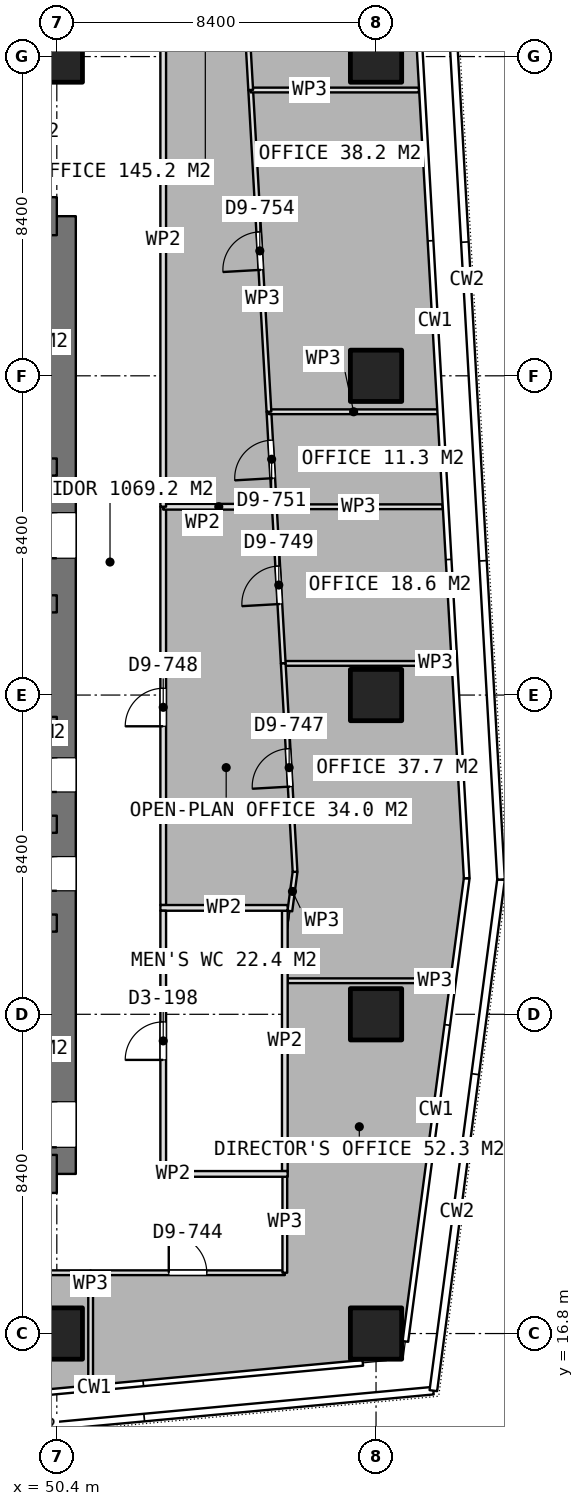
"""IFC4 building model, lengths in metres.
Left out: names, types, materials, properties, quantities, classifications, styles, units other than length and angle.
Written with IfcOpenShell. Run it as: python <this file> out.ifc"""

import sys

from ifc_helpers import new_model, si_unit, direction, frame, frame_2d, origin, origin_2d, place, context, subcontext, project, spatial, rectangle, extrude, element, fill, save


model = new_model("IFC4")
c1 = context("Model", 3, precision=1e-05, world=origin(), true_north=direction((0.0, 1.0)))
c2 = subcontext(c1, "Body", "Model", "MODEL_VIEW")
j1 = project(units=[si_unit("LENGTHUNIT", "METRE"), si_unit("PLANEANGLEUNIT", "RADIAN")], contexts=[c1])
p1 = place(None, origin())
s1 = spatial("IfcSite", under=j1, at=p1, CompositionType="ELEMENT")
p2 = place(p1, origin())
s2 = spatial("IfcBuilding", under=s1, at=p2, CompositionType="ELEMENT")
p3 = place(p2, frame((0.0, 0.0, 187.7)))
s3 = spatial("IfcBuildingStorey", under=s2, at=p3, CompositionType="ELEMENT", Elevation=187.7)
for number, where, z_axis, x_axis in (
    (1, (40.0, 21.0, 0.0), (0.0, 0.0, 1.0), (1.0, 0.0, 0.0)),
    (2, (40.0, 46.2, 0.0), (0.0, 0.0, 1.0), (1.0, 0.0, 0.0)),
):
    element("IfcWall", number, at=place(p3, frame(where, z_axis=z_axis, x_axis=x_axis)), inside=s3, PredefinedType="SHEAR", context=c2, shape_type="SweptSolid", body=[
        extrude(rectangle(XDim=10.4, YDim=1.0, at=frame_2d((5.2, 0.0))), origin(), (0.0, 0.0, 1.0), 3.75),
    ])
p4 = place(p3, frame((50.4, 21.0, 0.0), z_axis=(0.0, 0.0, 1.0), x_axis=(0.0, 1.0, 0.0)))
e3 = element("IfcWall", 3, at=p4, inside=s3, PredefinedType="SHEAR", context=c2, shape_type="SweptSolid", body=[
    extrude(rectangle(XDim=25.2, YDim=1.0, at=frame_2d((12.6, 0.0))), origin(), (0.0, 0.0, 1.0), 3.75),
])
p5 = place(p4, frame((16.2, 0.0, 0.0)))
e4 = element("IfcOpeningElement", 4, at=p5, cuts=e3, PredefinedType="OPENING", context=c2, shape_type="SweptSolid", body=[
    extrude(rectangle(XDim=1.2, YDim=2.1, at=frame_2d((0.6, 1.05))), frame((0.0, 0.51, 0.0), z_axis=(0.0, -1.0, 0.0), x_axis=(1.0, 0.0, 0.0)), (0.0, 0.0, 1.0), 1.02),
])
p6 = place(p4, frame((10.05, 0.0, 0.0)))
e5 = element("IfcOpeningElement", 5, at=p6, cuts=e3, PredefinedType="OPENING", context=c2, shape_type="SweptSolid", body=[
    extrude(rectangle(XDim=0.9, YDim=2.1, at=frame_2d((0.45, 1.05))), frame((0.0, 0.51, 0.0), z_axis=(0.0, -1.0, 0.0), x_axis=(1.0, 0.0, 0.0)), (0.0, 0.0, 1.0), 1.02),
])
p7 = place(p4, frame((7.45, 0.0, 0.0)))
e6 = element("IfcOpeningElement", 6, at=p7, cuts=e3, PredefinedType="OPENING", context=c2, shape_type="SweptSolid", body=[
    extrude(rectangle(XDim=0.9, YDim=2.1, at=frame_2d((0.45, 1.05))), frame((0.0, 0.51, 0.0), z_axis=(0.0, -1.0, 0.0), x_axis=(1.0, 0.0, 0.0)), (0.0, 0.0, 1.0), 1.02),
])
p8 = place(p4, frame((0.7, 0.0, 0.0)))
e7 = element("IfcOpeningElement", 7, at=p8, cuts=e3, PredefinedType="OPENING", context=c2, shape_type="SweptSolid", body=[
    extrude(rectangle(XDim=1.2, YDim=2.1, at=frame_2d((0.6, 1.05))), frame((0.0, 0.51, 0.0), z_axis=(0.0, -1.0, 0.0), x_axis=(1.0, 0.0, 0.0)), (0.0, 0.0, 1.0), 1.02),
])
for number, where, z_axis, x_axis in (
    (8, (43.8, 27.6, 0.0), (0.0, 0.0, 1.0), (1.0, 0.0, 0.0)),
    (9, (43.8, 30.2, 0.0), (0.0, 0.0, 1.0), (1.0, 0.0, 0.0)),
    (10, (43.8, 32.8, 0.0), (0.0, 0.0, 1.0), (1.0, 0.0, 0.0)),
):
    element("IfcWall", number, at=place(p3, frame(where, z_axis=z_axis, x_axis=x_axis)), inside=s3, PredefinedType="SHEAR", context=c2, shape_type="SweptSolid", body=[
        extrude(rectangle(XDim=6.6, YDim=0.45, at=frame_2d((3.3, 0.0))), origin(), (0.0, 0.0, 1.0), 3.75),
    ])
p9 = place(p3, frame((43.8, 36.0, 0.0), z_axis=(0.0, 0.0, 1.0), x_axis=(1.0, 0.0, 0.0)))
e11 = element("IfcWall", 11, at=p9, inside=s3, PredefinedType="SHEAR", context=c2, shape_type="SweptSolid", body=[
    extrude(rectangle(XDim=6.6, YDim=0.45, at=frame_2d((3.3, 0.0))), origin(), (0.0, 0.0, 1.0), 3.75),
])
p10 = place(p9, frame((2.65, 0.0, 0.0)))
e12 = element("IfcOpeningElement", 12, at=p10, cuts=e11, PredefinedType="OPENING", context=c2, shape_type="SweptSolid", body=[
    extrude(rectangle(XDim=1.3, YDim=2.1, at=frame_2d((0.65, 1.05))), frame((0.0, 0.235, 0.0), z_axis=(0.0, -1.0, 0.0), x_axis=(1.0, 0.0, 0.0)), (0.0, 0.0, 1.0), 0.47),
])
p11 = place(p3, frame((43.8, 39.6, 0.0), z_axis=(0.0, 0.0, 1.0), x_axis=(1.0, 0.0, 0.0)))
e13 = element("IfcWall", 13, at=p11, inside=s3, PredefinedType="SHEAR", context=c2, shape_type="SweptSolid", body=[
    extrude(rectangle(XDim=6.6, YDim=0.45, at=frame_2d((3.3, 0.0))), origin(), (0.0, 0.0, 1.0), 3.75),
])
p12 = place(p11, frame((0.425, 0.0, 0.0)))
e14 = element("IfcOpeningElement", 14, at=p12, cuts=e13, PredefinedType="OPENING", context=c2, shape_type="SweptSolid", body=[
    extrude(rectangle(XDim=1.2, YDim=2.1, at=frame_2d((0.6, 1.05))), frame((0.0, 0.235, 0.0), z_axis=(0.0, -1.0, 0.0), x_axis=(1.0, 0.0, 0.0)), (0.0, 0.0, 1.0), 0.47),
])
for number, where, z_axis, x_axis in (
    (15, (50.4, 16.8, 0.0), (0.0, 0.0, 1.0), (1.0, 0.0, 0.0)),
    (16, (50.4, 50.4, 0.0), (0.0, 0.0, 1.0), (1.0, 0.0, 0.0)),
    (17, (58.8, 16.8, 0.0), (0.0, 0.0, 1.0), (1.0, 0.0, 0.0)),
    (18, (58.8, 25.2, 0.0), (0.0, 0.0, 1.0), (1.0, 0.0, 0.0)),
    (19, (58.8, 33.6, 0.0), (0.0, 0.0, 1.0), (1.0, 0.0, 0.0)),
    (20, (58.8, 42.0, 0.0), (0.0, 0.0, 1.0), (1.0, 0.0, 0.0)),
    (21, (58.8, 50.4, 0.0), (0.0, 0.0, 1.0), (1.0, 0.0, 0.0)),
):
    element("IfcColumn", number, at=place(p3, frame(where, z_axis=z_axis, x_axis=x_axis)), inside=s3, PredefinedType="COLUMN", context=c2, shape_type="SweptSolid", body=[
        extrude(rectangle(XDim=1.35, YDim=1.35, at=origin_2d()), origin(), (0.0, 0.0, 1.0), 3.75),
    ])
for number, where, z_axis, x_axis in (
    (22, (53.125, 21.0, 0.0), (0.0, 0.0, 1.0), (1.0, 0.0, 0.0)),
    (23, (53.125, 28.0, 0.0), (0.0, 0.0, 1.0), (1.0, 0.0, 0.0)),
):
    element("IfcWall", number, at=place(p3, frame(where, z_axis=z_axis, x_axis=x_axis)), inside=s3, PredefinedType="PARTITIONING", context=c2, shape_type="SweptSolid", body=[
        extrude(rectangle(XDim=3.35, YDim=0.15, at=frame_2d((1.675, 0.0))), origin(), (0.0, 0.0, 1.0), 3.5),
    ])
p13 = place(p3, frame((53.2, 21.075, 0.0), z_axis=(0.0, 0.0, 1.0), x_axis=(0.0, 1.0, 0.0)))
e24 = element("IfcWall", 24, at=p13, inside=s3, PredefinedType="PARTITIONING", context=c2, shape_type="SweptSolid", body=[
    extrude(rectangle(XDim=6.85, YDim=0.15, at=frame_2d((3.425, 0.0))), origin(), (0.0, 0.0, 1.0), 3.5),
])
p14 = place(p13, frame((2.925, 0.0, 0.0)))
e25 = element("IfcOpeningElement", 25, at=p14, cuts=e24, PredefinedType="OPENING", context=c2, shape_type="SweptSolid", body=[
    extrude(rectangle(XDim=1.0, YDim=2.1, at=frame_2d((0.5, 1.05))), frame((0.0, 0.085, 0.0), z_axis=(0.0, -1.0, 0.0), x_axis=(1.0, 0.0, 0.0)), (0.0, 0.0, 1.0), 0.17),
])
p15 = place(p3, frame((56.4, 21.075, 0.0), z_axis=(0.0, 0.0, 1.0), x_axis=(0.0, 1.0, 0.0)))
e26 = element("IfcWall", 26, at=p15, inside=s3, PredefinedType="PARTITIONING", context=c2, shape_type="SweptSolid", body=[
    extrude(rectangle(XDim=6.85, YDim=0.15, at=frame_2d((3.425, 0.0))), origin(), (0.0, 0.0, 1.0), 3.5),
])
p16 = place(p3, frame((42.824, 18.4, 0.0), z_axis=(0.0, 0.0, 1.0), x_axis=(1.0, 0.0, 0.0)))
e27 = element("IfcWall", 27, at=p16, inside=s3, PredefinedType="PARTITIONING", context=c2, shape_type="SweptSolid", body=[
    extrude(rectangle(XDim=8.466, YDim=0.125, at=frame_2d((4.233, 0.0))), origin(), (0.0, 0.0, 1.0), 3.5),
])
p17 = place(p16, frame((3.733, 0.0, 0.0)))
e28 = element("IfcOpeningElement", 28, at=p17, cuts=e27, PredefinedType="OPENING", context=c2, shape_type="SweptSolid", body=[
    extrude(rectangle(XDim=1.0, YDim=2.1, at=frame_2d((0.5, 1.05))), frame((0.0, 0.073, 0.0), z_axis=(0.0, -1.0, 0.0), x_axis=(1.0, 0.0, 0.0)), (0.0, 0.0, 1.0), 0.145),
])
p18 = place(p3, frame((51.29, 18.4, 0.0), z_axis=(0.0, 0.0, 1.0), x_axis=(0.0, -1.0, 0.0)))
e29 = element("IfcWall", 29, at=p18, inside=s3, PredefinedType="PARTITIONING", context=c2, shape_type="SweptSolid", body=[
    extrude(rectangle(XDim=2.958, YDim=0.125, at=frame_2d((1.479, 0.0))), origin(), (0.0, 0.0, 1.0), 3.5),
])
p19 = place(p3, frame((51.291, 18.4, 0.0), z_axis=(0.0, 0.0, 1.0), x_axis=(1.0, 0.0, 0.0)))
e30 = element("IfcWall", 30, at=p19, inside=s3, PredefinedType="PARTITIONING", context=c2, shape_type="SweptSolid", body=[
    extrude(rectangle(XDim=5.109, YDim=0.125, at=frame_2d((2.554, 0.0))), origin(), (0.0, 0.0, 1.0), 3.5),
])
p20 = place(p19, frame((2.055, 0.0, 0.0)))
e31 = element("IfcOpeningElement", 31, at=p20, cuts=e30, PredefinedType="OPENING", context=c2, shape_type="SweptSolid", body=[
    extrude(rectangle(XDim=1.0, YDim=2.1, at=frame_2d((0.5, 1.05))), frame((0.0, 0.073, 0.0), z_axis=(0.0, -1.0, 0.0), x_axis=(1.0, 0.0, 0.0)), (0.0, 0.0, 1.0), 0.145),
])
p21 = place(p3, frame((56.4, 18.4, 0.0), z_axis=(0.0, 0.0, 1.0), x_axis=(0.0, 1.0, 0.0)))
e32 = element("IfcWall", 32, at=p21, inside=s3, PredefinedType="PARTITIONING", context=c2, shape_type="SweptSolid", body=[
    extrude(rectangle(XDim=2.675, YDim=0.125, at=frame_2d((1.337, 0.0))), origin(), (0.0, 0.0, 1.0), 3.5),
])
p22 = place(p3, frame((56.475, 26.083, 0.0), z_axis=(0.0, 0.0, 1.0), x_axis=(1.0, 0.0, 0.0)))
e33 = element("IfcWall", 33, at=p22, inside=s3, PredefinedType="PARTITIONING", context=c2, shape_type="SweptSolid", body=[
    extrude(rectangle(XDim=4.303, YDim=0.125, at=frame_2d((2.151, 0.0))), origin(), (0.0, 0.0, 1.0), 3.5),
])
p23 = place(p3, frame((56.669, 28.949, 0.0), z_axis=(0.0, 0.0, 1.0), x_axis=(-0.056624490323, 0.998395546412, 0.0)))
e34 = element("IfcWall", 34, at=p23, inside=s3, PredefinedType="PARTITIONING", context=c2, shape_type="SweptSolid", body=[
    extrude(rectangle(XDim=5.493, YDim=0.125, at=frame_2d((2.747, 0.0))), origin(), (0.0, 0.0, 1.0), 3.5),
])
p24 = place(p23, frame((2.246, 0.0, 0.0)))
e35 = element("IfcOpeningElement", 35, at=p24, cuts=e34, PredefinedType="OPENING", context=c2, shape_type="SweptSolid", body=[
    extrude(rectangle(XDim=1.0, YDim=2.1, at=frame_2d((0.5, 1.05))), frame((0.0, 0.073, 0.0), z_axis=(0.0, -1.0, 0.0), x_axis=(1.0, 0.0, 0.0)), (0.0, 0.0, 1.0), 0.145),
])
p25 = place(p3, frame((56.358, 34.433, 0.0), z_axis=(0.0, 0.0, 1.0), x_axis=(1.0, 0.0, 0.0)))
e36 = element("IfcWall", 36, at=p25, inside=s3, PredefinedType="PARTITIONING", context=c2, shape_type="SweptSolid", body=[
    extrude(rectangle(XDim=4.457, YDim=0.125, at=frame_2d((2.229, 0.0))), origin(), (0.0, 0.0, 1.0), 3.5),
])
p26 = place(p3, frame((56.533, 27.918, 0.0), z_axis=(0.0, 0.0, 1.0), x_axis=(0.130764223689, 0.991413494866, 0.0)))
e37 = element("IfcWall", 37, at=p26, inside=s3, PredefinedType="PARTITIONING", context=c2, shape_type="SweptSolid", body=[
    extrude(rectangle(XDim=1.04, YDim=0.125, at=frame_2d((0.52, 0.0))), origin(), (0.0, 0.0, 1.0), 3.5),
])
p27 = place(p3, frame((56.358, 34.434, 0.0), z_axis=(0.0, 0.0, 1.0), x_axis=(-0.056665720273, 0.998393207181, 0.0)))
e38 = element("IfcWall", 38, at=p27, inside=s3, PredefinedType="PARTITIONING", context=c2, shape_type="SweptSolid", body=[
    extrude(rectangle(XDim=4.127, YDim=0.125, at=frame_2d((2.064, 0.0))), origin(), (0.0, 0.0, 1.0), 3.5),
])
p28 = place(p27, frame((1.564, 0.0, 0.0)))
e39 = element("IfcOpeningElement", 39, at=p28, cuts=e38, PredefinedType="OPENING", context=c2, shape_type="SweptSolid", body=[
    extrude(rectangle(XDim=1.0, YDim=2.1, at=frame_2d((0.5, 1.05))), frame((0.0, 0.073, 0.0), z_axis=(0.0, -1.0, 0.0), x_axis=(1.0, 0.0, 0.0)), (0.0, 0.0, 1.0), 0.145),
])
p29 = place(p3, frame((56.124, 38.555, 0.0), z_axis=(0.0, 0.0, 1.0), x_axis=(1.0, 0.0, 0.0)))
e40 = element("IfcWall", 40, at=p29, inside=s3, PredefinedType="PARTITIONING", context=c2, shape_type="SweptSolid", body=[
    extrude(rectangle(XDim=4.427, YDim=0.125, at=frame_2d((2.213, 0.0))), origin(), (0.0, 0.0, 1.0), 3.5),
])
p30 = place(p3, frame((53.2, 28.075, 0.0), z_axis=(0.0, 0.0, 1.0), x_axis=(0.0, 1.0, 0.0)))
e41 = element("IfcWall", 41, at=p30, inside=s3, PredefinedType="PARTITIONING", context=c2, shape_type="SweptSolid", body=[
    extrude(rectangle(XDim=10.48, YDim=0.15, at=frame_2d((5.24, 0.0))), origin(), (0.0, 0.0, 1.0), 3.5),
])
p31 = place(p30, frame((4.703, 0.0, 0.0)))
e42 = element("IfcOpeningElement", 42, at=p31, cuts=e41, PredefinedType="OPENING", context=c2, shape_type="SweptSolid", body=[
    extrude(rectangle(XDim=1.0, YDim=2.1, at=frame_2d((0.5, 1.05))), frame((0.0, 0.085, 0.0), z_axis=(0.0, -1.0, 0.0), x_axis=(1.0, 0.0, 0.0)), (0.0, 0.0, 1.0), 0.17),
])
p32 = place(p3, frame((53.2, 38.555, 0.0), z_axis=(0.0, 0.0, 1.0), x_axis=(1.0, 0.0, 0.0)))
e43 = element("IfcWall", 43, at=p32, inside=s3, PredefinedType="PARTITIONING", context=c2, shape_type="SweptSolid", body=[
    extrude(rectangle(XDim=2.924, YDim=0.15, at=frame_2d((1.462, 0.0))), origin(), (0.0, 0.0, 1.0), 3.5),
])
p33 = place(p3, frame((56.124, 38.556, 0.0), z_axis=(0.0, 0.0, 1.0), x_axis=(-0.056788583238, 0.998386226274, 0.0)))
e44 = element("IfcWall", 44, at=p33, inside=s3, PredefinedType="PARTITIONING", context=c2, shape_type="SweptSolid", body=[
    extrude(rectangle(XDim=2.502, YDim=0.125, at=frame_2d((1.251, 0.0))), origin(), (0.0, 0.0, 1.0), 3.5),
])
p34 = place(p33, frame((0.751, 0.0, 0.0)))
e45 = element("IfcOpeningElement", 45, at=p34, cuts=e44, PredefinedType="OPENING", context=c2, shape_type="SweptSolid", body=[
    extrude(rectangle(XDim=1.0, YDim=2.1, at=frame_2d((0.5, 1.05))), frame((0.0, 0.073, 0.0), z_axis=(0.0, -1.0, 0.0), x_axis=(1.0, 0.0, 0.0)), (0.0, 0.0, 1.0), 0.145),
])
p35 = place(p3, frame((55.982, 41.054, 0.0), z_axis=(0.0, 0.0, 1.0), x_axis=(1.0, 0.0, 0.0)))
e46 = element("IfcWall", 46, at=p35, inside=s3, PredefinedType="PARTITIONING", context=c2, shape_type="SweptSolid", body=[
    extrude(rectangle(XDim=4.457, YDim=0.125, at=frame_2d((2.229, 0.0))), origin(), (0.0, 0.0, 1.0), 3.5),
])
p36 = place(p3, frame((55.982, 41.055, 0.0), z_axis=(0.0, 0.0, 1.0), x_axis=(-0.056610250967, 0.998396353902, 0.0)))
e47 = element("IfcWall", 47, at=p36, inside=s3, PredefinedType="PARTITIONING", context=c2, shape_type="SweptSolid", body=[
    extrude(rectangle(XDim=8.479, YDim=0.125, at=frame_2d((4.239, 0.0))), origin(), (0.0, 0.0, 1.0), 3.5),
])
p37 = place(p36, frame((3.739, 0.0, 0.0)))
e48 = element("IfcOpeningElement", 48, at=p37, cuts=e47, PredefinedType="OPENING", context=c2, shape_type="SweptSolid", body=[
    extrude(rectangle(XDim=1.0, YDim=2.1, at=frame_2d((0.5, 1.05))), frame((0.0, 0.073, 0.0), z_axis=(0.0, -1.0, 0.0), x_axis=(1.0, 0.0, 0.0)), (0.0, 0.0, 1.0), 0.145),
])
p38 = place(p3, frame((55.502, 49.52, 0.0), z_axis=(0.0, 0.0, 1.0), x_axis=(1.0, 0.0, 0.0)))
e49 = element("IfcWall", 49, at=p38, inside=s3, PredefinedType="PARTITIONING", context=c2, shape_type="SweptSolid", body=[
    extrude(rectangle(XDim=4.427, YDim=0.125, at=frame_2d((2.213, 0.0))), origin(), (0.0, 0.0, 1.0), 3.5),
])
p39 = place(p3, frame((55.502, 49.521, 0.0), z_axis=(0.0, 0.0, 1.0), x_axis=(-0.056774622162, 0.998387020287, 0.0)))
e50 = element("IfcWall", 50, at=p39, inside=s3, PredefinedType="PARTITIONING", context=c2, shape_type="SweptSolid", body=[
    extrude(rectangle(XDim=6.923, YDim=0.125, at=frame_2d((3.462, 0.0))), origin(), (0.0, 0.0, 1.0), 3.5),
])
p40 = place(p39, frame((2.962, 0.0, 0.0)))
e51 = element("IfcOpeningElement", 51, at=p40, cuts=e50, PredefinedType="OPENING", context=c2, shape_type="SweptSolid", body=[
    extrude(rectangle(XDim=1.0, YDim=2.1, at=frame_2d((0.5, 1.05))), frame((0.0, 0.073, 0.0), z_axis=(0.0, -1.0, 0.0), x_axis=(1.0, 0.0, 0.0)), (0.0, 0.0, 1.0), 0.145),
])
p41 = place(p3, frame((53.2, 38.556, 0.0), z_axis=(0.0, 0.0, 1.0), x_axis=(0.0, 1.0, 0.0)))
e52 = element("IfcWall", 52, at=p41, inside=s3, PredefinedType="PARTITIONING", context=c2, shape_type="SweptSolid", body=[
    extrude(rectangle(XDim=14.019, YDim=0.15, at=frame_2d((7.01, 0.0))), origin(), (0.0, 0.0, 1.0), 3.5),
])
p42 = place(p5, origin())
e53 = element("IfcDoor", 53, at=p42, inside=s3, OperationType="SINGLE_SWING_LEFT", PredefinedType="DOOR", context=c2, shape_type="SweptSolid", body=[
    extrude(rectangle(XDim=1.2, YDim=2.1, at=frame_2d((0.6, 1.05))), frame((0.0, 0.025, 0.0), z_axis=(0.0, -1.0, 0.0), x_axis=(1.0, 0.0, 0.0)), (0.0, 0.0, 1.0), 0.05),
])
fill(e4, e53)
p43 = place(p6, origin())
e54 = element("IfcDoor", 54, at=p43, inside=s3, OperationType="SINGLE_SWING_LEFT", PredefinedType="DOOR", context=c2, shape_type="SweptSolid", body=[
    extrude(rectangle(XDim=0.9, YDim=2.1, at=frame_2d((0.45, 1.05))), frame((0.0, 0.025, 0.0), z_axis=(0.0, -1.0, 0.0), x_axis=(1.0, 0.0, 0.0)), (0.0, 0.0, 1.0), 0.05),
])
fill(e5, e54)
p44 = place(p7, origin())
e55 = element("IfcDoor", 55, at=p44, inside=s3, OperationType="SINGLE_SWING_LEFT", PredefinedType="DOOR", context=c2, shape_type="SweptSolid", body=[
    extrude(rectangle(XDim=0.9, YDim=2.1, at=frame_2d((0.45, 1.05))), frame((0.0, 0.025, 0.0), z_axis=(0.0, -1.0, 0.0), x_axis=(1.0, 0.0, 0.0)), (0.0, 0.0, 1.0), 0.05),
])
fill(e6, e55)
p45 = place(p14, origin())
e56 = element("IfcDoor", 56, at=p45, inside=s3, OperationType="SINGLE_SWING_LEFT", PredefinedType="DOOR", context=c2, shape_type="SweptSolid", body=[
    extrude(rectangle(XDim=1.0, YDim=2.1, at=frame_2d((0.5, 1.05))), frame((0.0, 0.025, 0.0), z_axis=(0.0, -1.0, 0.0), x_axis=(1.0, 0.0, 0.0)), (0.0, 0.0, 1.0), 0.05),
])
fill(e25, e56)
p46 = place(p20, origin())
e57 = element("IfcDoor", 57, at=p46, inside=s3, OperationType="SINGLE_SWING_LEFT", PredefinedType="DOOR", context=c2, shape_type="SweptSolid", body=[
    extrude(rectangle(XDim=1.0, YDim=2.1, at=frame_2d((0.5, 1.05))), frame((0.0, 0.025, 0.0), z_axis=(0.0, -1.0, 0.0), x_axis=(1.0, 0.0, 0.0)), (0.0, 0.0, 1.0), 0.05),
])
fill(e31, e57)
p47 = place(p24, origin())
e58 = element("IfcDoor", 58, at=p47, inside=s3, OperationType="SINGLE_SWING_LEFT", PredefinedType="DOOR", context=c2, shape_type="SweptSolid", body=[
    extrude(rectangle(XDim=1.0, YDim=2.1, at=frame_2d((0.5, 1.05))), frame((0.0, 0.025, 0.0), z_axis=(0.0, -1.0, 0.0), x_axis=(1.0, 0.0, 0.0)), (0.0, 0.0, 1.0), 0.05),
])
fill(e35, e58)
p48 = place(p28, origin())
e59 = element("IfcDoor", 59, at=p48, inside=s3, OperationType="SINGLE_SWING_LEFT", PredefinedType="DOOR", context=c2, shape_type="SweptSolid", body=[
    extrude(rectangle(XDim=1.0, YDim=2.1, at=frame_2d((0.5, 1.05))), frame((0.0, 0.025, 0.0), z_axis=(0.0, -1.0, 0.0), x_axis=(1.0, 0.0, 0.0)), (0.0, 0.0, 1.0), 0.05),
])
fill(e39, e59)
p49 = place(p31, origin())
e60 = element("IfcDoor", 60, at=p49, inside=s3, OperationType="SINGLE_SWING_LEFT", PredefinedType="DOOR", context=c2, shape_type="SweptSolid", body=[
    extrude(rectangle(XDim=1.0, YDim=2.1, at=frame_2d((0.5, 1.05))), frame((0.0, 0.025, 0.0), z_axis=(0.0, -1.0, 0.0), x_axis=(1.0, 0.0, 0.0)), (0.0, 0.0, 1.0), 0.05),
])
fill(e42, e60)
p50 = place(p34, origin())
e61 = element("IfcDoor", 61, at=p50, inside=s3, OperationType="SINGLE_SWING_LEFT", PredefinedType="DOOR", context=c2, shape_type="SweptSolid", body=[
    extrude(rectangle(XDim=1.0, YDim=2.1, at=frame_2d((0.5, 1.05))), frame((0.0, 0.025, 0.0), z_axis=(0.0, -1.0, 0.0), x_axis=(1.0, 0.0, 0.0)), (0.0, 0.0, 1.0), 0.05),
])
fill(e45, e61)
p51 = place(p37, origin())
e62 = element("IfcDoor", 62, at=p51, inside=s3, OperationType="SINGLE_SWING_LEFT", PredefinedType="DOOR", context=c2, shape_type="SweptSolid", body=[
    extrude(rectangle(XDim=1.0, YDim=2.1, at=frame_2d((0.5, 1.05))), frame((0.0, 0.025, 0.0), z_axis=(0.0, -1.0, 0.0), x_axis=(1.0, 0.0, 0.0)), (0.0, 0.0, 1.0), 0.05),
])
fill(e48, e62)
p52 = place(p8, origin())
e63 = element("IfcDoor", 63, at=p52, inside=s3, OperationType="SINGLE_SWING_RIGHT", PredefinedType="DOOR", context=c2, shape_type="SweptSolid", body=[
    extrude(rectangle(XDim=1.2, YDim=2.1, at=frame_2d((0.6, 1.05))), frame((0.0, 0.025, 0.0), z_axis=(0.0, -1.0, 0.0), x_axis=(1.0, 0.0, 0.0)), (0.0, 0.0, 1.0), 0.05),
])
fill(e7, e63)
save(model, sys.argv[1])
